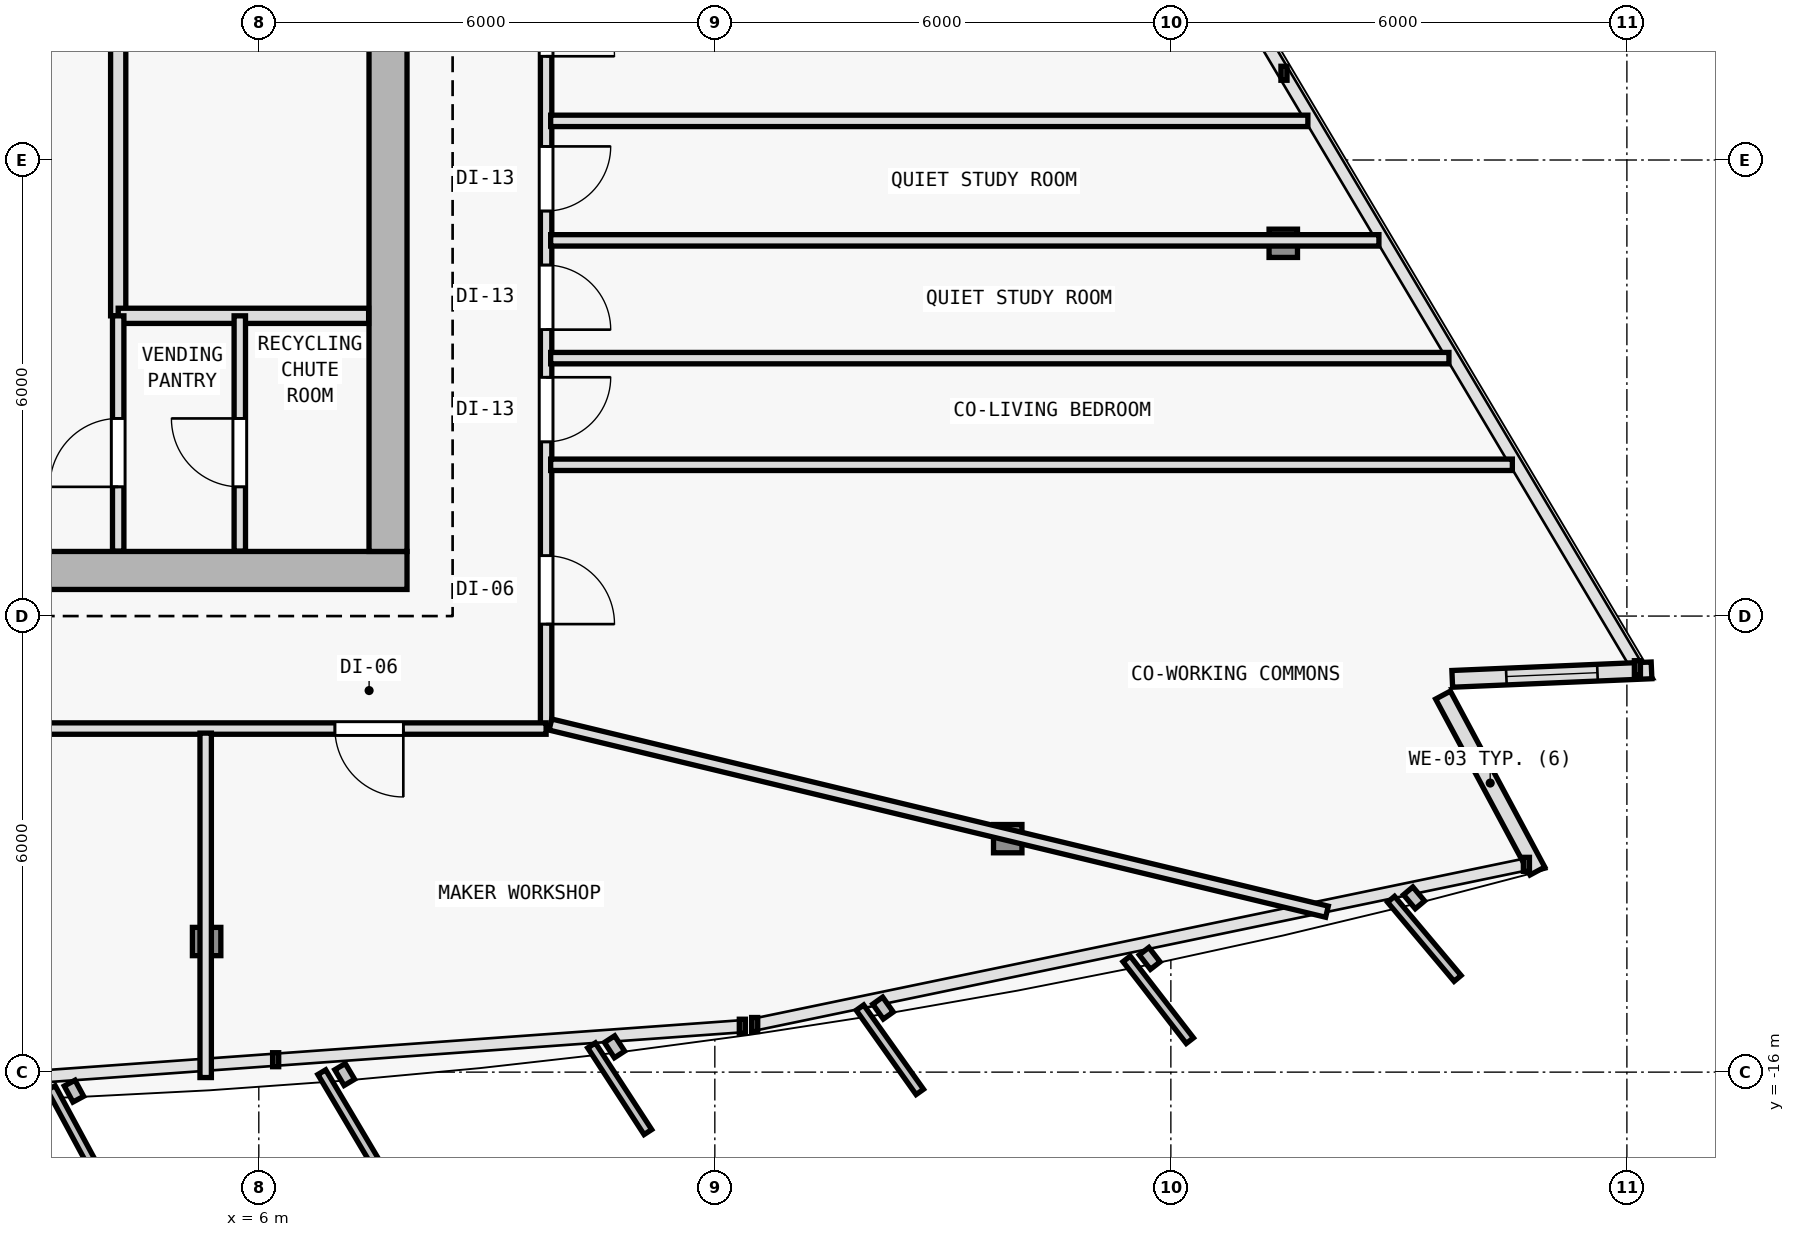
"""IFC4 building model, lengths in metres.
Left out: names, types, materials, properties, quantities, classifications, styles, units other than length and angle.
Written with IfcOpenShell. Run it as: python <this file> out.ifc"""

import sys

from ifc_helpers import new_model, si_unit, direction, frame, frame_2d, origin, origin_2d, place, context, subcontext, project, spatial, rectangle, i_section, extrude, element, fill, save


model = new_model("IFC4")
c1 = context("Model", 3, precision=1e-05, world=origin(), true_north=direction((0.0, 1.0)))
c2 = subcontext(c1, "Body", "Model", "MODEL_VIEW")
j1 = project(units=[si_unit("LENGTHUNIT", "METRE"), si_unit("PLANEANGLEUNIT", "RADIAN")], contexts=[c1])
p1 = place(None, origin())
s1 = spatial("IfcSite", under=j1, at=p1, CompositionType="ELEMENT")
p2 = place(p1, origin())
s2 = spatial("IfcBuilding", under=s1, at=p2, CompositionType="ELEMENT")
p3 = place(p2, frame((0.0, 0.0, 254.4)))
s3 = spatial("IfcBuildingStorey", under=s2, at=p3, CompositionType="ELEMENT", Elevation=254.4)
p4 = place(p3, frame((7.7, -9.4, 0.0), z_axis=(0.0, 0.0, 1.0), x_axis=(1.0, 0.0, 0.0)))
e1 = element("IfcColumn", 1, at=p4, inside=s3, PredefinedType="COLUMN", context=c2, shape_type="SweptSolid", body=[
    extrude(i_section(OverallWidth=0.374, OverallDepth=0.372, WebThickness=0.012, FlangeThickness=0.02, FilletRadius=0.015, at=origin_2d()), origin(), (0.0, 0.0, 1.0), 3.6),
])
p5 = place(p3, frame((5.313, -14.282, 0.006), z_axis=(-0.006934288159, 0.035283289748, 0.999353293441), x_axis=(-0.981229659911, -0.192842823335, 0.0)))
e2 = element("IfcColumn", 2, at=p5, inside=s3, PredefinedType="COLUMN", context=c2, shape_type="SweptSolid", body=[
    extrude(i_section(OverallWidth=0.374, OverallDepth=0.372, WebThickness=0.012, FlangeThickness=0.02, FilletRadius=0.015, at=origin_2d()), origin(), (0.0, 0.0, 1.0), 3.591),
])
p6 = place(p3, frame((15.854, -12.928, 0.006), z_axis=(-0.020596292833, 0.033511459955, 0.999226087917), x_axis=(-0.851954850327, -0.523615252838, 0.0)))
e3 = element("IfcColumn", 3, at=p6, inside=s3, PredefinedType="COLUMN", context=c2, shape_type="SweptSolid", body=[
    extrude(i_section(OverallWidth=0.374, OverallDepth=0.372, WebThickness=0.012, FlangeThickness=0.02, FilletRadius=0.015, at=origin_2d()), origin(), (0.0, 0.0, 1.0), 3.592),
])
p7 = place(p3, frame((19.479, -5.096, 0.006), z_axis=(-0.026107436898, 0.021620221181, 0.999425318758), x_axis=(-0.637813971185, -0.770190455771, 0.0)))
e4 = element("IfcColumn", 4, at=p7, inside=s3, PredefinedType="COLUMN", context=c2, shape_type="SweptSolid", body=[
    extrude(i_section(OverallWidth=0.374, OverallDepth=0.372, WebThickness=0.012, FlangeThickness=0.02, FilletRadius=0.015, at=origin_2d()), origin(), (0.0, 0.0, 1.0), 3.591),
])
p8 = place(p3, frame((21.581, -11.04, 0.0), z_axis=(0.0, 0.0, 1.0), x_axis=(0.472791303324, -0.881174434208, 0.0)))
e5 = element("IfcWall", 5, at=p8, inside=s3, PredefinedType="SOLIDWALL", context=c2, shape_type="SweptSolid", body=[
    extrude(rectangle(XDim=2.627, YDim=0.22, at=frame_2d((1.313, 0.0))), origin(), (0.0, 0.0, 1.0), 3.35),
])
p9 = place(p3, frame((24.324, -10.714, 0.0), z_axis=(0.0, 0.0, 1.0), x_axis=(-0.999095924753, -0.042512740932, 0.0)))
e6 = element("IfcWall", 6, at=p9, inside=s3, PredefinedType="SOLIDWALL", context=c2, shape_type="SweptSolid", body=[
    extrude(rectangle(XDim=2.625, YDim=0.22, at=frame_2d((1.312, 0.0))), origin(), (0.0, 0.0, 1.0), 3.35),
])
p10 = place(p9, frame((0.712, 0.0, 0.62)))
e7 = element("IfcOpeningElement", 7, at=p10, cuts=e6, PredefinedType="OPENING", context=c2, shape_type="SweptSolid", body=[
    extrude(rectangle(XDim=1.2, YDim=1.8, at=frame_2d((0.6, 0.9))), frame((0.0, 0.12, 0.0), z_axis=(0.0, -1.0, 0.0), x_axis=(1.0, 0.0, 0.0)), (0.0, 0.0, 1.0), 0.24),
])
p11 = place(p3, frame((-7.95, -9.4, 0.0), z_axis=(0.0, 0.0, 1.0), x_axis=(1.0, 0.0, 0.0)))
e8 = element("IfcWall", 8, at=p11, inside=s3, PredefinedType="SHEAR", context=c2, shape_type="SweptSolid", body=[
    extrude(rectangle(XDim=15.9, YDim=0.5, at=frame_2d((7.95, 0.0))), origin(), (0.0, 0.0, 1.0), 3.35),
])
p12 = place(p11, frame((9.6, 0.0, 0.0)))
e9 = element("IfcOpeningElement", 9, at=p12, cuts=e8, PredefinedType="OPENING", context=c2, shape_type="SweptSolid", body=[
    extrude(rectangle(XDim=1.5, YDim=2.2, at=frame_2d((0.75, 1.1))), frame((0.0, 0.26, 0.0), z_axis=(0.0, -1.0, 0.0), x_axis=(1.0, 0.0, 0.0)), (0.0, 0.0, 1.0), 0.52),
])
p13 = place(p3, frame((7.7, 9.95, 0.0), z_axis=(0.0, 0.0, 1.0), x_axis=(0.0, -1.0, 0.0)))
e10 = element("IfcWall", 10, at=p13, inside=s3, PredefinedType="SHEAR", context=c2, shape_type="SweptSolid", body=[
    extrude(rectangle(XDim=19.1, YDim=0.5, at=frame_2d((9.55, 0.0))), origin(), (0.0, 0.0, 1.0), 3.35),
])
p14 = place(p3, frame((4.15, -6.05, 0.0), z_axis=(0.0, 0.0, 1.0), x_axis=(0.0, 1.0, 0.0)))
e11 = element("IfcWall", 11, at=p14, inside=s3, PredefinedType="SOLIDWALL", context=c2, shape_type="SweptSolid", body=[
    extrude(rectangle(XDim=8.7, YDim=0.2, at=frame_2d((4.35, 0.0))), origin(), (0.0, 0.0, 1.0), 3.35),
])
p15 = place(p14, frame((3.6, 0.0, 0.0)))
e12 = element("IfcOpeningElement", 12, at=p15, cuts=e11, PredefinedType="OPENING", context=c2, shape_type="SweptSolid", body=[
    extrude(rectangle(XDim=0.95, YDim=2.1, at=frame_2d((0.475, 1.05))), frame((0.0, 0.11, 0.0), z_axis=(0.0, -1.0, 0.0), x_axis=(1.0, 0.0, 0.0)), (0.0, 0.0, 1.0), 0.22),
])
p16 = place(p3, frame((4.15, -6.05, 0.0), z_axis=(0.0, 0.0, 1.0), x_axis=(1.0, 0.0, 0.0)))
e13 = element("IfcWall", 13, at=p16, inside=s3, PredefinedType="SOLIDWALL", context=c2, shape_type="SweptSolid", body=[
    extrude(rectangle(XDim=3.295, YDim=0.2, at=frame_2d((1.647, 0.0))), origin(), (0.0, 0.0, 1.0), 3.35),
])
p17 = place(p3, frame((4.15, -9.145, 0.0), z_axis=(0.0, 0.0, 1.0), x_axis=(0.0, 1.0, 0.0)))
e14 = element("IfcWall", 14, at=p17, inside=s3, PredefinedType="PARTITIONING", context=c2, shape_type="SweptSolid", body=[
    extrude(rectangle(XDim=3.095, YDim=0.15, at=frame_2d((1.547, 0.0))), origin(), (0.0, 0.0, 1.0), 3.35),
])
p18 = place(p17, frame((0.845, 0.0, 0.0)))
e15 = element("IfcOpeningElement", 15, at=p18, cuts=e14, PredefinedType="OPENING", context=c2, shape_type="SweptSolid", body=[
    extrude(rectangle(XDim=0.9, YDim=2.1, at=frame_2d((0.45, 1.05))), frame((0.0, 0.085, 0.0), z_axis=(0.0, -1.0, 0.0), x_axis=(1.0, 0.0, 0.0)), (0.0, 0.0, 1.0), 0.17),
])
p19 = place(p3, frame((5.75, -9.145, 0.0), z_axis=(0.0, 0.0, 1.0), x_axis=(0.0, 1.0, 0.0)))
e16 = element("IfcWall", 16, at=p19, inside=s3, PredefinedType="PARTITIONING", context=c2, shape_type="SweptSolid", body=[
    extrude(rectangle(XDim=3.095, YDim=0.15, at=frame_2d((1.547, 0.0))), origin(), (0.0, 0.0, 1.0), 3.35),
])
p20 = place(p19, frame((0.845, 0.0, 0.0)))
e17 = element("IfcOpeningElement", 17, at=p20, cuts=e16, PredefinedType="OPENING", context=c2, shape_type="SweptSolid", body=[
    extrude(rectangle(XDim=0.9, YDim=2.1, at=frame_2d((0.45, 1.05))), frame((0.0, 0.085, 0.0), z_axis=(0.0, -1.0, 0.0), x_axis=(1.0, 0.0, 0.0)), (0.0, 0.0, 1.0), 0.17),
])
p21 = place(p3, frame((9.78, 8.226, 0.0), z_axis=(0.0, 0.0, 1.0), x_axis=(0.0, -1.0, 0.0)))
e18 = element("IfcWall", 18, at=p21, inside=s3, PredefinedType="PARTITIONING", context=c2, shape_type="SweptSolid", body=[
    extrude(rectangle(XDim=19.706, YDim=0.15, at=frame_2d((9.853, 0.0))), origin(), (0.0, 0.0, 1.0), 2.725),
])
p22 = place(p21, frame((17.432, 0.0, 0.0)))
e19 = element("IfcOpeningElement", 19, at=p22, cuts=e18, PredefinedType="OPENING", context=c2, shape_type="SweptSolid", body=[
    extrude(rectangle(XDim=0.9, YDim=2.1, at=frame_2d((0.45, 1.05))), frame((0.0, 0.085, 0.0), z_axis=(0.0, -1.0, 0.0), x_axis=(1.0, 0.0, 0.0)), (0.0, 0.0, 1.0), 0.17),
])
p23 = place(p21, frame((15.084, 0.0, 0.0)))
e20 = element("IfcOpeningElement", 20, at=p23, cuts=e18, PredefinedType="OPENING", context=c2, shape_type="SweptSolid", body=[
    extrude(rectangle(XDim=0.85, YDim=2.1, at=frame_2d((0.425, 1.05))), frame((0.0, 0.085, 0.0), z_axis=(0.0, -1.0, 0.0), x_axis=(1.0, 0.0, 0.0)), (0.0, 0.0, 1.0), 0.17),
])
p24 = place(p21, frame((13.608, 0.0, 0.0)))
e21 = element("IfcOpeningElement", 21, at=p24, cuts=e18, PredefinedType="OPENING", context=c2, shape_type="SweptSolid", body=[
    extrude(rectangle(XDim=0.85, YDim=2.1, at=frame_2d((0.425, 1.05))), frame((0.0, 0.085, 0.0), z_axis=(0.0, -1.0, 0.0), x_axis=(1.0, 0.0, 0.0)), (0.0, 0.0, 1.0), 0.17),
])
p25 = place(p21, frame((12.047, 0.0, 0.0)))
e22 = element("IfcOpeningElement", 22, at=p25, cuts=e18, PredefinedType="OPENING", context=c2, shape_type="SweptSolid", body=[
    extrude(rectangle(XDim=0.85, YDim=2.1, at=frame_2d((0.425, 1.05))), frame((0.0, 0.085, 0.0), z_axis=(0.0, -1.0, 0.0), x_axis=(1.0, 0.0, 0.0)), (0.0, 0.0, 1.0), 0.17),
])
p26 = place(p21, frame((9.961, 0.0, 0.0)))
e23 = element("IfcOpeningElement", 23, at=p26, cuts=e18, PredefinedType="OPENING", context=c2, shape_type="SweptSolid", body=[
    extrude(rectangle(XDim=0.9, YDim=2.1, at=frame_2d((0.45, 1.05))), frame((0.0, 0.085, 0.0), z_axis=(0.0, -1.0, 0.0), x_axis=(1.0, 0.0, 0.0)), (0.0, 0.0, 1.0), 0.17),
])
p27 = place(p21, frame((7.397, 0.0, 0.0)))
e24 = element("IfcOpeningElement", 24, at=p27, cuts=e18, PredefinedType="OPENING", context=c2, shape_type="SweptSolid", body=[
    extrude(rectangle(XDim=0.9, YDim=2.1, at=frame_2d((0.45, 1.05))), frame((0.0, 0.085, 0.0), z_axis=(0.0, -1.0, 0.0), x_axis=(1.0, 0.0, 0.0)), (0.0, 0.0, 1.0), 0.17),
])
p28 = place(p21, frame((4.797, 0.0, 0.0)))
e25 = element("IfcOpeningElement", 25, at=p28, cuts=e18, PredefinedType="OPENING", context=c2, shape_type="SweptSolid", body=[
    extrude(rectangle(XDim=0.9, YDim=2.1, at=frame_2d((0.45, 1.05))), frame((0.0, 0.085, 0.0), z_axis=(0.0, -1.0, 0.0), x_axis=(1.0, 0.0, 0.0)), (0.0, 0.0, 1.0), 0.17),
])
p29 = place(p3, frame((9.78, -11.48, 0.0), z_axis=(0.0, 0.0, 1.0), x_axis=(-1.0, 0.0, 0.0)))
e26 = element("IfcWall", 26, at=p29, inside=s3, PredefinedType="PARTITIONING", context=c2, shape_type="SweptSolid", body=[
    extrude(rectangle(XDim=19.56, YDim=0.15, at=frame_2d((9.78, 0.0))), origin(), (0.0, 0.0, 1.0), 3.025),
])
p30 = place(p29, frame((15.99, 0.0, 0.0)))
e27 = element("IfcOpeningElement", 27, at=p30, cuts=e26, PredefinedType="OPENING", context=c2, shape_type="SweptSolid", body=[
    extrude(rectangle(XDim=0.9, YDim=2.1, at=frame_2d((0.45, 1.05))), frame((0.0, 0.085, 0.0), z_axis=(0.0, -1.0, 0.0), x_axis=(1.0, 0.0, 0.0)), (0.0, 0.0, 1.0), 0.17),
])
p31 = place(p29, frame((8.539, 0.0, 0.0)))
e28 = element("IfcOpeningElement", 28, at=p31, cuts=e26, PredefinedType="OPENING", context=c2, shape_type="SweptSolid", body=[
    extrude(rectangle(XDim=0.9, YDim=2.1, at=frame_2d((0.45, 1.05))), frame((0.0, 0.085, 0.0), z_axis=(0.0, -1.0, 0.0), x_axis=(1.0, 0.0, 0.0)), (0.0, 0.0, 1.0), 0.17),
])
p32 = place(p29, frame((1.879, 0.0, 0.0)))
e29 = element("IfcOpeningElement", 29, at=p32, cuts=e26, PredefinedType="OPENING", context=c2, shape_type="SweptSolid", body=[
    extrude(rectangle(XDim=0.9, YDim=2.1, at=frame_2d((0.45, 1.05))), frame((0.0, 0.085, 0.0), z_axis=(0.0, -1.0, 0.0), x_axis=(1.0, 0.0, 0.0)), (0.0, 0.0, 1.0), 0.17),
])
p33 = place(p3, frame((5.301, -11.54, 0.0), z_axis=(0.0, 0.0, 1.0), x_axis=(0.0, -1.0, 0.0)))
e30 = element("IfcWall", 30, at=p33, inside=s3, PredefinedType="PARTITIONING", context=c2, shape_type="SweptSolid", body=[
    extrude(rectangle(XDim=4.531, YDim=0.15, at=frame_2d((2.266, 0.0))), origin(), (0.0, 0.0, 1.0), 3.015),
])
p34 = place(p3, frame((9.837, -11.427, 0.0), z_axis=(0.0, 0.0, 1.0), x_axis=(0.972169477142, -0.234278696671, 0.0)))
e31 = element("IfcWall", 31, at=p34, inside=s3, PredefinedType="PARTITIONING", context=c2, shape_type="SweptSolid", body=[
    extrude(rectangle(XDim=10.51, YDim=0.15, at=frame_2d((5.255, 0.0))), origin(), (0.0, 0.0, 1.0), 3.015),
])
p35 = place(p3, frame((9.84, -5.057, 0.0), z_axis=(0.0, 0.0, 1.0), x_axis=(1.0, 0.0, 0.0)))
e32 = element("IfcWall", 32, at=p35, inside=s3, PredefinedType="PARTITIONING", context=c2, shape_type="SweptSolid", body=[
    extrude(rectangle(XDim=10.897, YDim=0.15, at=frame_2d((5.449, 0.0))), origin(), (0.0, 0.0, 1.0), 2.775),
])
p36 = place(p3, frame((9.84, -8.01, 0.0), z_axis=(0.0, 0.0, 1.0), x_axis=(1.0, 0.0, 0.0)))
e33 = element("IfcWall", 33, at=p36, inside=s3, PredefinedType="PARTITIONING", context=c2, shape_type="SweptSolid", body=[
    extrude(rectangle(XDim=12.653, YDim=0.15, at=frame_2d((6.326, 0.0))), origin(), (0.0, 0.0, 1.0), 2.875),
])
p37 = place(p3, frame((9.84, -6.607, 0.0), z_axis=(0.0, 0.0, 1.0), x_axis=(1.0, 0.0, 0.0)))
e34 = element("IfcWall", 34, at=p37, inside=s3, PredefinedType="PARTITIONING", context=c2, shape_type="SweptSolid", body=[
    extrude(rectangle(XDim=11.819, YDim=0.15, at=frame_2d((5.909, 0.0))), origin(), (0.0, 0.0, 1.0), 2.775),
])
p38 = place(p3, frame((9.84, -3.485, 0.0), z_axis=(0.0, 0.0, 1.0), x_axis=(1.0, 0.0, 0.0)))
e35 = element("IfcWall", 35, at=p38, inside=s3, PredefinedType="PARTITIONING", context=c2, shape_type="SweptSolid", body=[
    extrude(rectangle(XDim=9.962, YDim=0.15, at=frame_2d((4.981, 0.0))), origin(), (0.0, 0.0, 1.0), 2.775),
])
p39 = place(p10, origin())
e36 = element("IfcWindow", 36, at=p39, inside=s3, PartitioningType="SINGLE_PANEL", PredefinedType="WINDOW", context=c2, shape_type="SweptSolid", body=[
    extrude(rectangle(XDim=1.2, YDim=1.8, at=frame_2d((0.6, 0.9))), frame((0.0, 0.03, 0.0), z_axis=(0.0, -1.0, 0.0), x_axis=(1.0, 0.0, 0.0)), (0.0, 0.0, 1.0), 0.06),
])
fill(e7, e36)
p40 = place(p18, origin())
e37 = element("IfcDoor", 37, at=p40, inside=s3, OperationType="SINGLE_SWING_LEFT", PredefinedType="DOOR", context=c2, shape_type="SweptSolid", body=[
    extrude(rectangle(XDim=0.9, YDim=2.1, at=frame_2d((0.45, 1.05))), frame((0.0, 0.025, 0.0), z_axis=(0.0, -1.0, 0.0), x_axis=(1.0, 0.0, 0.0)), (0.0, 0.0, 1.0), 0.05),
])
fill(e15, e37)
p41 = place(p20, origin())
e38 = element("IfcDoor", 38, at=p41, inside=s3, OperationType="SINGLE_SWING_RIGHT", PredefinedType="DOOR", context=c2, shape_type="SweptSolid", body=[
    extrude(rectangle(XDim=0.9, YDim=2.1, at=frame_2d((0.45, 1.05))), frame((0.0, 0.025, 0.0), z_axis=(0.0, -1.0, 0.0), x_axis=(1.0, 0.0, 0.0)), (0.0, 0.0, 1.0), 0.05),
])
fill(e17, e38)
p42 = place(p32, origin())
e39 = element("IfcDoor", 39, at=p42, inside=s3, OperationType="SINGLE_SWING_LEFT", PredefinedType="DOOR", context=c2, shape_type="SweptSolid", body=[
    extrude(rectangle(XDim=0.9, YDim=2.1, at=frame_2d((0.45, 1.05))), frame((0.0, 0.025, 0.0), z_axis=(0.0, -1.0, 0.0), x_axis=(1.0, 0.0, 0.0)), (0.0, 0.0, 1.0), 0.05),
])
fill(e29, e39)
p43 = place(p22, origin())
e40 = element("IfcDoor", 40, at=p43, inside=s3, OperationType="SINGLE_SWING_RIGHT", PredefinedType="DOOR", context=c2, shape_type="SweptSolid", body=[
    extrude(rectangle(XDim=0.9, YDim=2.1, at=frame_2d((0.45, 1.05))), frame((0.0, 0.025, 0.0), z_axis=(0.0, -1.0, 0.0), x_axis=(1.0, 0.0, 0.0)), (0.0, 0.0, 1.0), 0.05),
])
fill(e19, e40)
p44 = place(p23, origin())
e41 = element("IfcDoor", 41, at=p44, inside=s3, OperationType="SINGLE_SWING_LEFT", PredefinedType="DOOR", context=c2, shape_type="SweptSolid", body=[
    extrude(rectangle(XDim=0.85, YDim=2.1, at=frame_2d((0.425, 1.05))), frame((0.0, 0.025, 0.0), z_axis=(0.0, -1.0, 0.0), x_axis=(1.0, 0.0, 0.0)), (0.0, 0.0, 1.0), 0.05),
])
fill(e20, e41)
p45 = place(p24, origin())
e42 = element("IfcDoor", 42, at=p45, inside=s3, OperationType="SINGLE_SWING_RIGHT", PredefinedType="DOOR", context=c2, shape_type="SweptSolid", body=[
    extrude(rectangle(XDim=0.85, YDim=2.1, at=frame_2d((0.425, 1.05))), frame((0.0, 0.025, 0.0), z_axis=(0.0, -1.0, 0.0), x_axis=(1.0, 0.0, 0.0)), (0.0, 0.0, 1.0), 0.05),
])
fill(e21, e42)
p46 = place(p25, origin())
e43 = element("IfcDoor", 43, at=p46, inside=s3, OperationType="SINGLE_SWING_LEFT", PredefinedType="DOOR", context=c2, shape_type="SweptSolid", body=[
    extrude(rectangle(XDim=0.85, YDim=2.1, at=frame_2d((0.425, 1.05))), frame((0.0, 0.025, 0.0), z_axis=(0.0, -1.0, 0.0), x_axis=(1.0, 0.0, 0.0)), (0.0, 0.0, 1.0), 0.05),
])
fill(e22, e43)
p47 = place(p26, origin())
e44 = element("IfcDoor", 44, at=p47, inside=s3, OperationType="SINGLE_SWING_RIGHT", PredefinedType="DOOR", context=c2, shape_type="SweptSolid", body=[
    extrude(rectangle(XDim=0.9, YDim=2.1, at=frame_2d((0.45, 1.05))), frame((0.0, 0.025, 0.0), z_axis=(0.0, -1.0, 0.0), x_axis=(1.0, 0.0, 0.0)), (0.0, 0.0, 1.0), 0.05),
])
fill(e23, e44)
save(model, sys.argv[1])
